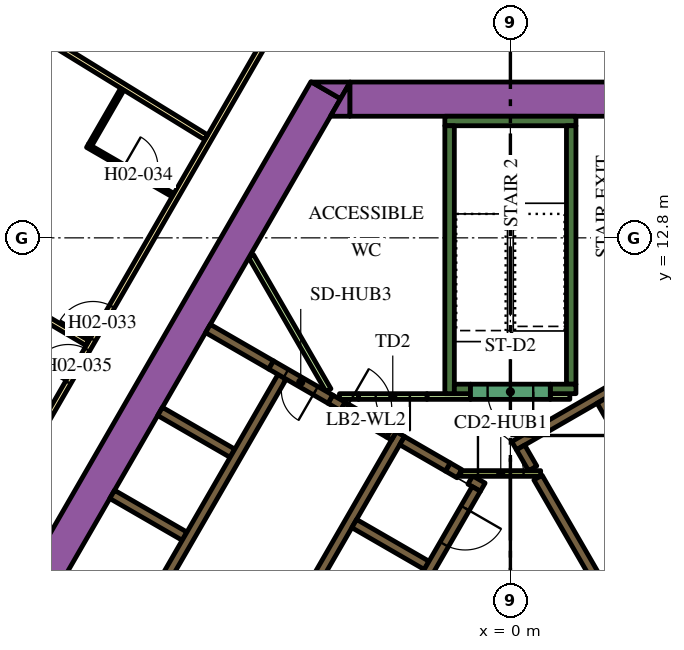
"""IFC4 building model, lengths in metres.
Left out: names, types, materials, properties, quantities, classifications, styles, units other than length and angle.
Written with IfcOpenShell. Run it as: python <this file> out.ifc"""

import sys

from ifc_helpers import new_model, si_unit, direction, frame, frame_2d, origin, place, context, subcontext, project, spatial, polyline, rectangle, outline, extrude, element, fill, save


model = new_model("IFC4")
c1 = context("Model", 3, precision=1e-05, world=origin(), true_north=direction((0.0, 1.0)))
c2 = subcontext(c1, "Body", "Model", "MODEL_VIEW")
j1 = project(units=[si_unit("LENGTHUNIT", "METRE"), si_unit("PLANEANGLEUNIT", "RADIAN")], contexts=[c1])
p1 = place(None, origin())
s1 = spatial("IfcSite", under=j1, at=p1, CompositionType="ELEMENT")
p2 = place(p1, origin())
s2 = spatial("IfcBuilding", under=s1, at=p2, CompositionType="ELEMENT")
p3 = place(p2, frame((0.0, 0.0, 47.1)))
s3 = spatial("IfcBuildingStorey", under=s2, at=p3, CompositionType="ELEMENT", Elevation=47.1)
p4 = place(p3, frame((-15.36, -1.503, 0.0), z_axis=(0.0, 0.0, 1.0), x_axis=(0.50000389221, 0.866023156604, 0.0)))
e1 = element("IfcWall", 1, at=p4, inside=s3, PredefinedType="SOLIDWALL", context=c2, shape_type="SweptSolid", body=[
    extrude(rectangle(XDim=21.0, YDim=0.9, at=frame_2d((10.5, 0.0))), origin(), (0.0, 0.0, 1.0), 3.9),
])
p5 = place(p3, origin())
e2 = element("IfcWall", 2, at=p5, inside=s3, PredefinedType="SOLIDWALL", context=c2, shape_type="SweptSolid", body=[
    extrude(outline(polyline([(-4.215, 16.9), (-4.469, 16.46), (-5.231, 16.9), (-4.215, 16.9)])), origin(), (0.0, 0.0, 1.0), 3.9),
])
p6 = place(p3, frame((-4.224, 16.45, 0.0), z_axis=(0.0, 0.0, 1.0), x_axis=(1.0, 0.0, 0.0)))
e3 = element("IfcWall", 3, at=p6, inside=s3, PredefinedType="SOLIDWALL", context=c2, shape_type="SweptSolid", body=[
    extrude(rectangle(XDim=9.488, YDim=0.9, at=frame_2d((4.744, 0.0))), origin(), (0.0, 0.0, 1.0), 3.9),
])
e4 = element("IfcWall", 4, at=p5, inside=s3, PredefinedType="SOLIDWALL", context=c2, shape_type="SweptSolid", body=[
    extrude(outline(polyline([(-4.734, 16.0), (-4.226, 16.88), (-4.226, 16.0), (-4.734, 16.0)])), origin(), (0.0, 0.0, 1.0), 3.9),
])
p7 = place(p3, frame((-1.725, 15.875, 0.0), z_axis=(0.0, 0.0, 1.0), x_axis=(1.0, 0.0, 0.0)))
e5 = element("IfcWall", 5, at=p7, inside=s3, PredefinedType="SOLIDWALL", context=c2, shape_type="SweptSolid", body=[
    extrude(rectangle(XDim=3.45, YDim=0.25, at=frame_2d((1.725, 0.0))), origin(), (0.0, 0.0, 1.0), 3.9),
])
p8 = place(p3, frame((1.6, 8.95, 0.0), z_axis=(0.0, 0.0, 1.0), x_axis=(0.0, 1.0, 0.0)))
e6 = element("IfcWall", 6, at=p8, inside=s3, PredefinedType="SOLIDWALL", context=c2, shape_type="SweptSolid", body=[
    extrude(rectangle(XDim=6.8, YDim=0.25, at=frame_2d((3.4, 0.0))), origin(), (0.0, 0.0, 1.0), 3.9),
])
p9 = place(p3, frame((1.05, 8.825, 0.0), z_axis=(0.0, 0.0, 1.0), x_axis=(1.0, 0.0, 0.0)))
e7 = element("IfcWall", 7, at=p9, inside=s3, PredefinedType="SOLIDWALL", context=c2, shape_type="SweptSolid", body=[
    extrude(rectangle(XDim=0.675, YDim=0.25, at=frame_2d((0.337, 0.0))), origin(), (0.0, 0.0, 1.0), 3.9),
])
p10 = place(p3, frame((-1.6, 8.7, 0.0), z_axis=(0.0, 0.0, 1.0), x_axis=(0.0, 1.0, 0.0)))
e8 = element("IfcWall", 8, at=p10, inside=s3, PredefinedType="SOLIDWALL", context=c2, shape_type="SweptSolid", body=[
    extrude(rectangle(XDim=7.05, YDim=0.25, at=frame_2d((3.525, 0.0))), origin(), (0.0, 0.0, 1.0), 3.9),
])
p11 = place(p3, frame((-1.475, 8.825, 0.0), z_axis=(0.0, 0.0, 1.0), x_axis=(1.0, 0.0, 0.0)))
e9 = element("IfcWall", 9, at=p11, inside=s3, PredefinedType="SOLIDWALL", context=c2, shape_type="SweptSolid", body=[
    extrude(rectangle(XDim=0.425, YDim=0.25, at=frame_2d((0.212, 0.0))), origin(), (0.0, 0.0, 1.0), 3.9),
])
e10 = element("IfcWall", 10, at=p5, inside=s3, PredefinedType="SOLIDWALL", context=c2, shape_type="SweptSolid", body=[
    extrude(outline(polyline([(2.776, 8.733), (2.499, 8.573), (2.498, 8.573), (2.498, 8.573), (2.282, 8.448), (2.282, 8.448), (0.377, 7.348), (0.16, 7.223), (0.035, 7.439), (3.032, 9.169), (3.03, 9.152), (3.03, 9.133), (3.031, 9.113), (3.035, 9.094), (3.04, 9.075), (3.047, 9.057), (3.056, 9.039), (3.119, 8.931), (2.776, 8.733)])), origin(), (0.0, 0.0, 1.0), 3.9),
])
p12 = place(p3, frame((0.268, 7.285, 0.0), z_axis=(0.0, 0.0, 1.0), x_axis=(0.500098681536, -0.865968422476, 0.0)))
e11 = element("IfcWall", 11, at=p12, inside=s3, PredefinedType="SOLIDWALL", context=c2, shape_type="SweptSolid", body=[
    extrude(rectangle(XDim=0.636, YDim=0.25, at=frame_2d((0.318, 0.0))), origin(), (0.0, 0.0, 1.0), 3.9),
])
p13 = place(p3, frame((5.97, -2.591, 0.0), z_axis=(0.0, 0.0, 1.0), x_axis=(-0.499994469932, 0.866028596547, 0.0)))
e12 = element("IfcWall", 12, at=p13, inside=s3, PredefinedType="SOLIDWALL", context=c2, shape_type="SweptSolid", body=[
    extrude(rectangle(XDim=10.488, YDim=0.25, at=frame_2d((5.244, 0.0))), origin(), (0.0, 0.0, 1.0), 3.9),
])
p14 = place(p3, frame((-8.06, -1.311, 0.0), z_axis=(0.0, 0.0, 1.0), x_axis=(0.50000273126, 0.866023826885, 0.0)))
e13 = element("IfcWall", 13, at=p14, inside=s3, PredefinedType="SOLIDWALL", context=c2, shape_type="SweptSolid", body=[
    extrude(rectangle(XDim=10.33, YDim=0.25, at=frame_2d((5.165, 0.0))), origin(), (0.0, 0.0, 1.0), 3.9),
])
p15 = place(p3, frame((-1.342, 6.595, 0.0), z_axis=(0.0, 0.0, 1.0), x_axis=(-0.866046247233, 0.49996389635, 0.0)))
e14 = element("IfcWall", 14, at=p15, inside=s3, PredefinedType="SOLIDWALL", context=c2, shape_type="SweptSolid", body=[
    extrude(rectangle(XDim=0.35, YDim=0.25, at=frame_2d((0.175, 0.0))), origin(), (0.0, 0.0, 1.0), 3.9),
])
p16 = place(p3, frame((-1.647, 6.771, 0.0), z_axis=(0.0, 0.0, 1.0), x_axis=(-0.865971728693, 0.500092956464, 0.0)))
e15 = element("IfcWall", 15, at=p16, inside=s3, PredefinedType="SOLIDWALL", context=c2, shape_type="SweptSolid", body=[
    extrude(rectangle(XDim=1.388, YDim=0.25, at=frame_2d((0.694, 0.0))), origin(), (0.0, 0.0, 1.0), 3.9),
])
p17 = place(p3, frame((-0.728, 6.24, 0.0), z_axis=(0.0, 0.0, 1.0), x_axis=(-0.866088799389, 0.499890179513, 0.0)))
e16 = element("IfcWall", 16, at=p17, inside=s3, PredefinedType="SOLIDWALL", context=c2, shape_type="SweptSolid", body=[
    extrude(rectangle(XDim=0.378, YDim=0.25, at=frame_2d((0.189, 0.0))), origin(), (0.0, 0.0, 1.0), 3.9),
])
p18 = place(p3, frame((-2.204, 4.182, 0.0), z_axis=(0.0, 0.0, 1.0), x_axis=(-0.866008176907, 0.50002983664, 0.0)))
e17 = element("IfcWall", 17, at=p18, inside=s3, PredefinedType="SOLIDWALL", context=c2, shape_type="SweptSolid", body=[
    extrude(rectangle(XDim=2.2, YDim=0.25, at=frame_2d((1.1, 0.0))), origin(), (0.0, 0.0, 1.0), 3.9),
])
e18 = element("IfcWall", 18, at=p5, inside=s3, PredefinedType="SOLIDWALL", context=c2, shape_type="SweptSolid", body=[
    extrude(outline(polyline([(-3.128, 7.481), (-3.259, 7.557), (-3.134, 7.773), (-3.003, 7.698), (-3.128, 7.481)])), origin(), (0.0, 0.0, 1.0), 3.9),
])
for number, where, z_axis, x_axis in (
    (19, (-8.574, 4.95, 0.0), (0.0, 0.0, 1.0), (-0.866, 0.5, 0.0)),
    (20, (-7.314, 7.132, 0.0), (0.0, 0.0, 1.0), (-0.866, 0.5, 0.0)),
):
    element("IfcWall", number, at=place(p3, frame(where, z_axis=z_axis, x_axis=x_axis)), inside=s3, PredefinedType="SOLIDWALL", context=c2, shape_type="SweptSolid", body=[
        extrude(rectangle(XDim=2.2, YDim=0.25, at=frame_2d((1.1, 0.0))), origin(), (0.0, 0.0, 1.0), 3.9),
    ])
p19 = place(p3, frame((-6.296, 9.455, 0.0), z_axis=(0.0, 0.0, 1.0), x_axis=(-0.866011930837, 0.500023335103, 0.0)))
e21 = element("IfcWall", 21, at=p19, inside=s3, PredefinedType="SOLIDWALL", context=c2, shape_type="SweptSolid", body=[
    extrude(rectangle(XDim=1.92, YDim=0.25, at=frame_2d((0.96, 0.0))), origin(), (0.0, 0.0, 1.0), 3.9),
])
p20 = place(p3, frame((-4.409, 8.365, 0.0), z_axis=(0.0, 0.0, 1.0), x_axis=(-0.866057014183, 0.499945245186, 0.0)))
e22 = element("IfcWall", 22, at=p20, inside=s3, PredefinedType="SOLIDWALL", context=c2, shape_type="SweptSolid", body=[
    extrude(rectangle(XDim=0.379, YDim=0.25, at=frame_2d((0.19, 0.0))), origin(), (0.0, 0.0, 1.0), 3.9),
])
p21 = place(p3, frame((-2.195, 8.625, 0.0), z_axis=(0.0, 0.0, 1.0), x_axis=(1.0, 0.0, 0.0)))
e23 = element("IfcWall", 23, at=p21, inside=s3, PredefinedType="PARTITIONING", context=c2, shape_type="SweptSolid", body=[
    extrude(rectangle(XDim=1.145, YDim=0.15, at=frame_2d((0.573, 0.0))), origin(), (0.0, 0.0, 1.0), 2.75),
])
p22 = place(p3, frame((-6.823, 12.318, 0.0), z_axis=(0.0, 0.0, 1.0), x_axis=(0.500007885066, -0.866020851292, 0.0)))
e24 = element("IfcWall", 24, at=p22, inside=s3, PredefinedType="PARTITIONING", context=c2, shape_type="SweptSolid", body=[
    extrude(rectangle(XDim=4.072, YDim=0.15, at=frame_2d((2.036, 0.0))), origin(), (0.0, 0.0, 1.0), 2.75),
])
p23 = place(p3, frame((-4.498, 8.625, 0.0), z_axis=(0.0, 0.0, 1.0), x_axis=(1.0, 0.0, 0.0)))
e25 = element("IfcWall", 25, at=p23, inside=s3, PredefinedType="PARTITIONING", context=c2, shape_type="SweptSolid", body=[
    extrude(rectangle(XDim=0.502, YDim=0.15, at=frame_2d((0.251, 0.0))), origin(), (0.0, 0.0, 1.0), 2.75),
])
p24 = place(p3, frame((1.05, 8.625, 0.0), z_axis=(0.0, 0.0, 1.0), x_axis=(1.0, 0.0, 0.0)))
e26 = element("IfcWall", 26, at=p24, inside=s3, PredefinedType="PARTITIONING", context=c2, shape_type="SweptSolid", body=[
    extrude(rectangle(XDim=0.514, YDim=0.15, at=frame_2d((0.257, 0.0))), origin(), (0.0, 0.0, 1.0), 2.75),
])
p25 = place(p3, frame((8.565, -2.185, 0.0), z_axis=(0.0, 0.0, 1.0), x_axis=(-0.499997954832, 0.866026584559, 0.0)))
e27 = element("IfcWall", 27, at=p25, inside=s3, PredefinedType="SOLIDWALL", context=c2, shape_type="SweptSolid", body=[
    extrude(rectangle(XDim=12.35, YDim=0.25, at=frame_2d((6.175, 0.0))), origin(), (0.0, 0.0, 1.0), 3.9),
])
p26 = place(p25, frame((5.725, 0.0, 0.0)))
e28 = element("IfcOpeningElement", 28, at=p26, cuts=e27, PredefinedType="OPENING", context=c2, shape_type="SweptSolid", body=[
    extrude(rectangle(XDim=0.9, YDim=2.1, at=frame_2d((0.45, 1.05))), frame((0.0, 0.135, 0.0), z_axis=(0.0, -1.0, 0.0), x_axis=(1.0, 0.0, 0.0)), (0.0, 0.0, 1.0), 0.27),
])
p27 = place(p3, frame((-6.008, 9.144, 0.0), z_axis=(0.0, 0.0, 1.0), x_axis=(-0.500006956611, -0.866021387346, 0.0)))
e29 = element("IfcWall", 29, at=p27, inside=s3, PredefinedType="SOLIDWALL", context=c2, shape_type="SweptSolid", body=[
    extrude(rectangle(XDim=9.83, YDim=0.25, at=frame_2d((4.915, 0.0))), origin(), (0.0, 0.0, 1.0), 3.9),
])
p28 = place(p27, frame((6.985, 0.0, 0.0)))
e30 = element("IfcOpeningElement", 30, at=p28, cuts=e29, PredefinedType="OPENING", context=c2, shape_type="SweptSolid", body=[
    extrude(rectangle(XDim=0.9, YDim=2.1, at=frame_2d((0.45, 1.05))), frame((0.0, 0.135, 0.0), z_axis=(0.0, -1.0, 0.0), x_axis=(1.0, 0.0, 0.0)), (0.0, 0.0, 1.0), 0.27),
])
p29 = place(p3, frame((-0.898, 6.194, 0.0), z_axis=(0.0, 0.0, 1.0), x_axis=(-0.499996202215, -0.866027596426, 0.0)))
e31 = element("IfcWall", 31, at=p29, inside=s3, PredefinedType="SOLIDWALL", context=c2, shape_type="SweptSolid", body=[
    extrude(rectangle(XDim=9.83, YDim=0.25, at=frame_2d((4.915, 0.0))), origin(), (0.0, 0.0, 1.0), 3.9),
])
p30 = place(p29, frame((0.585, 0.0, 0.0)))
e32 = element("IfcOpeningElement", 32, at=p30, cuts=e31, PredefinedType="OPENING", context=c2, shape_type="SweptSolid", body=[
    extrude(rectangle(XDim=1.1, YDim=2.1, at=frame_2d((0.55, 1.05))), frame((0.0, 0.135, 0.0), z_axis=(0.0, -1.0, 0.0), x_axis=(1.0, 0.0, 0.0)), (0.0, 0.0, 1.0), 0.27),
])
p31 = place(p29, frame((3.105, 0.0, 0.0)))
e33 = element("IfcOpeningElement", 33, at=p31, cuts=e31, PredefinedType="OPENING", context=c2, shape_type="SweptSolid", body=[
    extrude(rectangle(XDim=1.1, YDim=2.1, at=frame_2d((0.55, 1.05))), frame((0.0, 0.135, 0.0), z_axis=(0.0, -1.0, 0.0), x_axis=(1.0, 0.0, 0.0)), (0.0, 0.0, 1.0), 0.27),
])
p32 = place(p29, frame((5.625, 0.0, 0.0)))
e34 = element("IfcOpeningElement", 34, at=p32, cuts=e31, PredefinedType="OPENING", context=c2, shape_type="SweptSolid", body=[
    extrude(rectangle(XDim=1.1, YDim=2.1, at=frame_2d((0.55, 1.05))), frame((0.0, 0.135, 0.0), z_axis=(0.0, -1.0, 0.0), x_axis=(1.0, 0.0, 0.0)), (0.0, 0.0, 1.0), 0.27),
])
p33 = place(p29, frame((8.145, 0.0, 0.0)))
e35 = element("IfcOpeningElement", 35, at=p33, cuts=e31, PredefinedType="OPENING", context=c2, shape_type="SweptSolid", body=[
    extrude(rectangle(XDim=1.1, YDim=2.1, at=frame_2d((0.55, 1.05))), frame((0.0, 0.135, 0.0), z_axis=(0.0, -1.0, 0.0), x_axis=(1.0, 0.0, 0.0)), (0.0, 0.0, 1.0), 0.27),
])
p34 = place(p3, frame((1.05, 8.75, 0.0), z_axis=(0.0, 0.0, 1.0), x_axis=(-1.0, 0.0, 0.0)))
e36 = element("IfcWall", 36, at=p34, inside=s3, PredefinedType="SOLIDWALL", context=c2, shape_type="SweptSolid", body=[
    extrude(rectangle(XDim=2.1, YDim=0.4, at=frame_2d((1.05, 0.0))), origin(), (0.0, 0.0, 1.0), 3.9),
])
p35 = place(p34, frame((0.45, 0.0, 0.0)))
e37 = element("IfcOpeningElement", 37, at=p35, cuts=e36, PredefinedType="OPENING", context=c2, shape_type="SweptSolid", body=[
    extrude(rectangle(XDim=1.2, YDim=2.1, at=frame_2d((0.6, 1.05))), frame((0.0, 0.21, 0.0), z_axis=(0.0, -1.0, 0.0), x_axis=(1.0, 0.0, 0.0)), (0.0, 0.0, 1.0), 0.42),
])
p36 = place(p3, frame((-2.195, 8.625, 0.0), z_axis=(0.0, 0.0, 1.0), x_axis=(-1.0, 0.0, 0.0)))
e38 = element("IfcWall", 38, at=p36, inside=s3, PredefinedType="PARTITIONING", context=c2, shape_type="SweptSolid", body=[
    extrude(rectangle(XDim=1.8, YDim=0.15, at=frame_2d((0.9, 0.0))), origin(), (0.0, 0.0, 1.0), 2.75),
])
p37 = place(p36, frame((0.45, 0.0, 0.0)))
e39 = element("IfcOpeningElement", 39, at=p37, cuts=e38, PredefinedType="OPENING", context=c2, shape_type="SweptSolid", body=[
    extrude(rectangle(XDim=0.9, YDim=2.1, at=frame_2d((0.45, 1.05))), frame((0.0, 0.085, 0.0), z_axis=(0.0, -1.0, 0.0), x_axis=(1.0, 0.0, 0.0)), (0.0, 0.0, 1.0), 0.17),
])
p38 = place(p3, frame((-1.303, 6.6, 0.0), z_axis=(0.0, 0.0, 1.0), x_axis=(1.0, 0.0, 0.0)))
e40 = element("IfcWall", 40, at=p38, inside=s3, PredefinedType="PARTITIONING", context=c2, shape_type="SweptSolid", body=[
    extrude(rectangle(XDim=2.1, YDim=0.15, at=frame_2d((1.05, 0.0))), origin(), (0.0, 0.0, 1.0), 3.9),
])
p39 = place(p38, frame((0.45, 0.0, 0.0)))
e41 = element("IfcOpeningElement", 41, at=p39, cuts=e40, PredefinedType="OPENING", context=c2, shape_type="SweptSolid", body=[
    extrude(rectangle(XDim=1.2, YDim=2.1, at=frame_2d((0.6, 1.05))), frame((0.0, 0.085, 0.0), z_axis=(0.0, -1.0, 0.0), x_axis=(1.0, 0.0, 0.0)), (0.0, 0.0, 1.0), 0.17),
])
p40 = place(p3, frame((-4.409, 8.365, 0.0), z_axis=(0.0, 0.0, 1.0), x_axis=(0.866034573852, -0.49998411664, 0.0)))
e42 = element("IfcWall", 42, at=p40, inside=s3, PredefinedType="SOLIDWALL", context=c2, shape_type="SweptSolid", body=[
    extrude(rectangle(XDim=1.4, YDim=0.25, at=frame_2d((0.7, 0.0))), origin(), (0.0, 0.0, 1.0), 3.9),
])
p41 = place(p40, frame((0.1, 0.0, 0.0)))
e43 = element("IfcOpeningElement", 43, at=p41, cuts=e42, PredefinedType="OPENING", context=c2, shape_type="SweptSolid", body=[
    extrude(rectangle(XDim=1.2, YDim=2.1, at=frame_2d((0.6, 1.05))), frame((0.0, 0.135, 0.0), z_axis=(0.0, -1.0, 0.0), x_axis=(1.0, 0.0, 0.0)), (0.0, 0.0, 1.0), 0.27),
])
p42 = place(p3, frame((-4.737, 8.555, 0.0), z_axis=(0.0, 0.0, 1.0), x_axis=(-0.865989075817, 0.500062916607, 0.0)))
e44 = element("IfcWall", 44, at=p42, inside=s3, PredefinedType="SOLIDWALL", context=c2, shape_type="SweptSolid", body=[
    extrude(rectangle(XDim=1.8, YDim=0.25, at=frame_2d((0.9, 0.0))), origin(), (0.0, 0.0, 1.0), 3.9),
])
p43 = place(p42, frame((0.45, 0.0, 0.0)))
e45 = element("IfcOpeningElement", 45, at=p43, cuts=e44, PredefinedType="OPENING", context=c2, shape_type="SweptSolid", body=[
    extrude(rectangle(XDim=0.9, YDim=2.1, at=frame_2d((0.45, 1.05))), frame((0.0, 0.135, 0.0), z_axis=(0.0, -1.0, 0.0), x_axis=(1.0, 0.0, 0.0)), (0.0, 0.0, 1.0), 0.27),
])
p44 = place(p3, frame((-19.081, -3.9, 0.0), z_axis=(0.0, 0.0, 1.0), x_axis=(0.499998313975, 0.866026377209, 0.0)))
e46 = element("IfcWall", 46, at=p44, inside=s3, PredefinedType="PARTITIONING", context=c2, shape_type="SweptSolid", body=[
    extrude(rectangle(XDim=25.766, YDim=0.15, at=frame_2d((12.883, 0.0))), origin(), (0.0, 0.0, 1.0), 2.75),
])
p45 = place(p44, frame((16.196, 0.0, 0.0)))
e47 = element("IfcOpeningElement", 47, at=p45, cuts=e46, PredefinedType="OPENING", context=c2, shape_type="SweptSolid", body=[
    extrude(rectangle(XDim=1.0, YDim=2.1, at=frame_2d((0.5, 1.05))), frame((0.0, 0.085, 0.0), z_axis=(0.0, -1.0, 0.0), x_axis=(1.0, 0.0, 0.0)), (0.0, 0.0, 1.0), 0.17),
])
p46 = place(p44, frame((14.889, 0.0, 0.0)))
e48 = element("IfcOpeningElement", 48, at=p46, cuts=e46, PredefinedType="OPENING", context=c2, shape_type="SweptSolid", body=[
    extrude(rectangle(XDim=1.0, YDim=2.1, at=frame_2d((0.5, 1.05))), frame((0.0, 0.085, 0.0), z_axis=(0.0, -1.0, 0.0), x_axis=(1.0, 0.0, 0.0)), (0.0, 0.0, 1.0), 0.17),
])
p47 = place(p44, frame((3.698, 0.0, 0.0)))
e49 = element("IfcOpeningElement", 49, at=p47, cuts=e46, PredefinedType="OPENING", context=c2, shape_type="SweptSolid", body=[
    extrude(rectangle(XDim=1.1, YDim=2.1, at=frame_2d((0.55, 1.05))), frame((0.0, 0.085, 0.0), z_axis=(0.0, -1.0, 0.0), x_axis=(1.0, 0.0, 0.0)), (0.0, 0.0, 1.0), 0.17),
])
p48 = place(p44, frame((2.392, 0.0, 0.0)))
e50 = element("IfcOpeningElement", 50, at=p48, cuts=e46, PredefinedType="OPENING", context=c2, shape_type="SweptSolid", body=[
    extrude(rectangle(XDim=1.0, YDim=2.1, at=frame_2d((0.5, 1.05))), frame((0.0, 0.085, 0.0), z_axis=(0.0, -1.0, 0.0), x_axis=(1.0, 0.0, 0.0)), (0.0, 0.0, 1.0), 0.17),
])
p49 = place(p3, frame((-17.856, 13.999, 0.0), z_axis=(0.0, 0.0, 1.0), x_axis=(0.861371519381, -0.507975497047, 0.0)))
e51 = element("IfcWall", 51, at=p49, inside=s3, PredefinedType="PARTITIONING", context=c2, shape_type="SweptSolid", body=[
    extrude(rectangle(XDim=7.804, YDim=0.15, at=frame_2d((3.902, 0.0))), origin(), (0.0, 0.0, 1.0), 2.75),
])
p50 = place(p3, frame((-14.558, 19.475, 0.0), z_axis=(0.0, 0.0, 1.0), x_axis=(0.851829455142, -0.523819223925, 0.0)))
e52 = element("IfcWall", 52, at=p50, inside=s3, PredefinedType="PARTITIONING", context=c2, shape_type="SweptSolid", body=[
    extrude(rectangle(XDim=7.688, YDim=0.15, at=frame_2d((3.844, 0.0))), origin(), (0.0, 0.0, 1.0), 2.75),
])
p51 = place(p3, frame((-11.129, 15.224, 0.0), z_axis=(0.0, 0.0, 1.0), x_axis=(0.866021400173, -0.500006934395, 0.0)))
e53 = element("IfcWall", 53, at=p51, inside=s3, PredefinedType="PARTITIONING", context=c2, shape_type="SweptSolid", body=[
    extrude(rectangle(XDim=2.6, YDim=0.1, at=frame_2d((1.3, 0.0))), origin(), (0.0, 0.0, 1.0), 2.75),
])
p52 = place(p51, frame((1.1, 0.0, 0.0)))
e54 = element("IfcOpeningElement", 54, at=p52, cuts=e53, PredefinedType="OPENING", context=c2, shape_type="SweptSolid", body=[
    extrude(rectangle(XDim=0.9, YDim=2.1, at=frame_2d((0.45, 1.05))), frame((0.0, 0.06, 0.0), z_axis=(0.0, -1.0, 0.0), x_axis=(1.0, 0.0, 0.0)), (0.0, 0.0, 1.0), 0.12),
])
p53 = place(p3, frame((-11.061, 15.242, 0.0), z_axis=(0.0, 0.0, 1.0), x_axis=(0.499976720371, 0.866038843867, 0.0)))
e55 = element("IfcWall", 55, at=p53, inside=s3, PredefinedType="PARTITIONING", context=c2, shape_type="SweptSolid", body=[
    extrude(rectangle(XDim=1.69, YDim=0.1, at=frame_2d((0.845, 0.0))), origin(), (0.0, 0.0, 1.0), 2.75),
])
p54 = place(p30, origin())
e56 = element("IfcDoor", 56, at=p54, inside=s3, OperationType="DOUBLE_DOOR_SLIDING", PredefinedType="DOOR", context=c2, shape_type="SweptSolid", body=[
    extrude(rectangle(XDim=1.1, YDim=2.1, at=frame_2d((0.55, 1.05))), frame((0.0, 0.025, 0.0), z_axis=(0.0, -1.0, 0.0), x_axis=(1.0, 0.0, 0.0)), (0.0, 0.0, 1.0), 0.05),
])
fill(e32, e56)
p55 = place(p35, origin())
e57 = element("IfcDoor", 57, at=p55, inside=s3, OperationType="SINGLE_SWING_LEFT", PredefinedType="DOOR", context=c2, shape_type="SweptSolid", body=[
    extrude(rectangle(XDim=1.2, YDim=2.1, at=frame_2d((0.6, 1.05))), frame((0.0, 0.025, 0.0), z_axis=(0.0, -1.0, 0.0), x_axis=(1.0, 0.0, 0.0)), (0.0, 0.0, 1.0), 0.05),
])
fill(e37, e57)
p56 = place(p37, origin())
e58 = element("IfcDoor", 58, at=p56, inside=s3, OperationType="SINGLE_SWING_LEFT", PredefinedType="DOOR", context=c2, shape_type="SweptSolid", body=[
    extrude(rectangle(XDim=0.9, YDim=2.1, at=frame_2d((0.45, 1.05))), frame((0.0, 0.025, 0.0), z_axis=(0.0, -1.0, 0.0), x_axis=(1.0, 0.0, 0.0)), (0.0, 0.0, 1.0), 0.05),
])
fill(e39, e58)
p57 = place(p39, origin())
e59 = element("IfcDoor", 59, at=p57, inside=s3, OperationType="SINGLE_SWING_LEFT", PredefinedType="DOOR", context=c2, shape_type="SweptSolid", body=[
    extrude(rectangle(XDim=1.2, YDim=2.1, at=frame_2d((0.6, 1.05))), frame((0.0, 0.025, 0.0), z_axis=(0.0, -1.0, 0.0), x_axis=(1.0, 0.0, 0.0)), (0.0, 0.0, 1.0), 0.05),
])
fill(e41, e59)
p58 = place(p41, origin())
e60 = element("IfcDoor", 60, at=p58, inside=s3, OperationType="SINGLE_SWING_LEFT", PredefinedType="DOOR", context=c2, shape_type="SweptSolid", body=[
    extrude(rectangle(XDim=1.2, YDim=2.1, at=frame_2d((0.6, 1.05))), frame((0.0, 0.025, 0.0), z_axis=(0.0, -1.0, 0.0), x_axis=(1.0, 0.0, 0.0)), (0.0, 0.0, 1.0), 0.05),
])
fill(e43, e60)
p59 = place(p43, origin())
e61 = element("IfcDoor", 61, at=p59, inside=s3, OperationType="SINGLE_SWING_LEFT", PredefinedType="DOOR", context=c2, shape_type="SweptSolid", body=[
    extrude(rectangle(XDim=0.9, YDim=2.1, at=frame_2d((0.45, 1.05))), frame((0.0, 0.025, 0.0), z_axis=(0.0, -1.0, 0.0), x_axis=(1.0, 0.0, 0.0)), (0.0, 0.0, 1.0), 0.05),
])
fill(e45, e61)
p60 = place(p45, origin())
e62 = element("IfcDoor", 62, at=p60, inside=s3, OperationType="SINGLE_SWING_LEFT", PredefinedType="DOOR", context=c2, shape_type="SweptSolid", body=[
    extrude(rectangle(XDim=1.0, YDim=2.1, at=frame_2d((0.5, 1.05))), frame((0.0, 0.025, 0.0), z_axis=(0.0, -1.0, 0.0), x_axis=(1.0, 0.0, 0.0)), (0.0, 0.0, 1.0), 0.05),
])
fill(e47, e62)
p61 = place(p52, origin())
e63 = element("IfcDoor", 63, at=p61, inside=s3, OperationType="SINGLE_SWING_RIGHT", PredefinedType="DOOR", context=c2, shape_type="SweptSolid", body=[
    extrude(rectangle(XDim=0.9, YDim=2.1, at=frame_2d((0.45, 1.05))), frame((0.0, 0.025, 0.0), z_axis=(0.0, -1.0, 0.0), x_axis=(1.0, 0.0, 0.0)), (0.0, 0.0, 1.0), 0.05),
])
fill(e54, e63)
p62 = place(p46, origin())
e64 = element("IfcDoor", 64, at=p62, inside=s3, OperationType="SINGLE_SWING_RIGHT", PredefinedType="DOOR", context=c2, shape_type="SweptSolid", body=[
    extrude(rectangle(XDim=1.0, YDim=2.1, at=frame_2d((0.5, 1.05))), frame((0.0, 0.025, 0.0), z_axis=(0.0, -1.0, 0.0), x_axis=(1.0, 0.0, 0.0)), (0.0, 0.0, 1.0), 0.05),
])
fill(e48, e64)
save(model, sys.argv[1])
